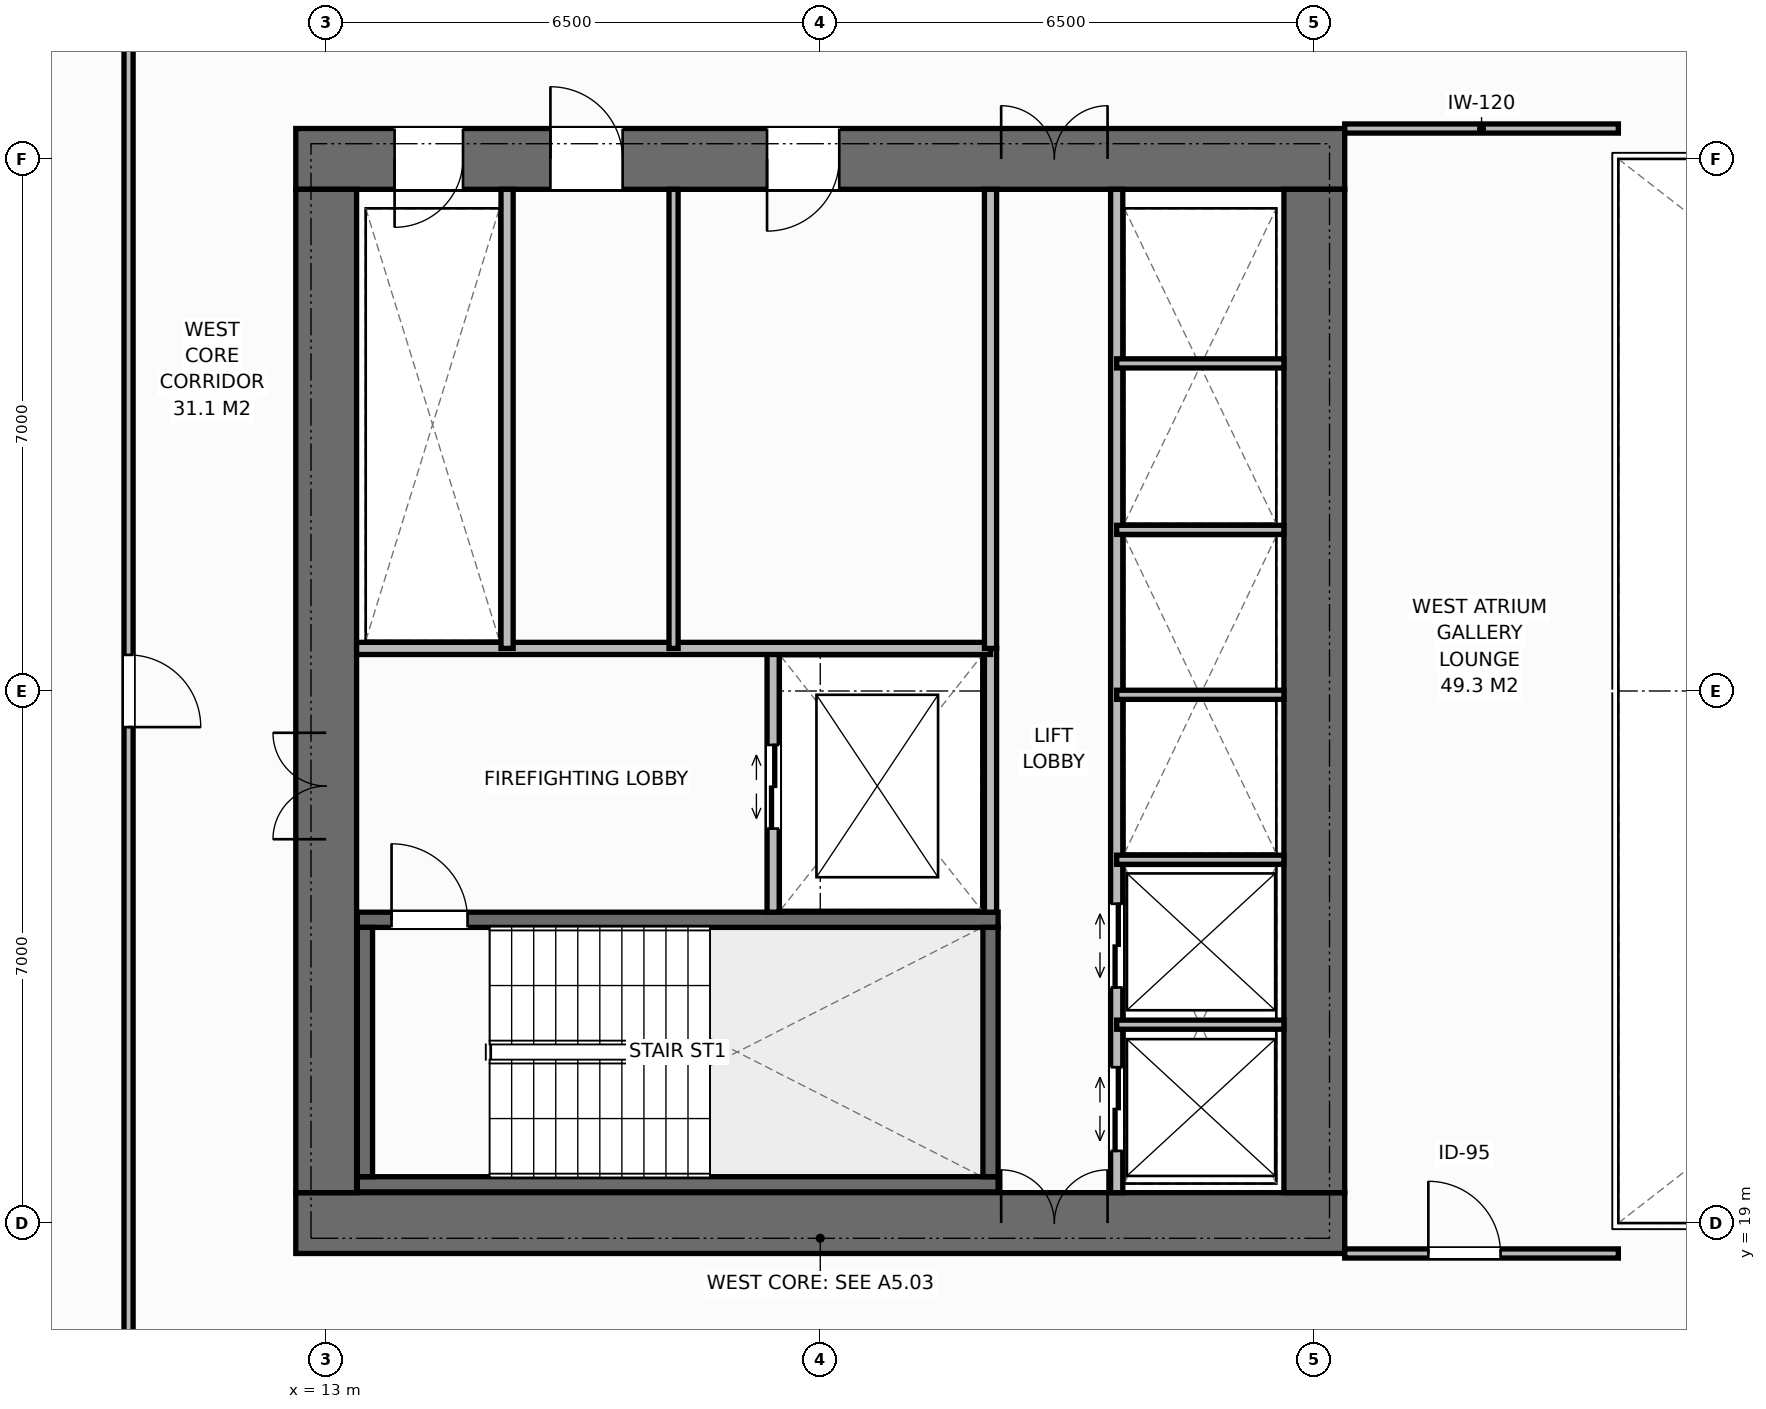
"""IFC4 building model, lengths in metres.
Left out: names, types, materials, properties, quantities, classifications, styles, units other than length and angle.
Written with IfcOpenShell. Run it as: python <this file> out.ifc"""

import sys

from ifc_helpers import new_model, si_unit, direction, frame, frame_2d, origin, place, context, subcontext, project, spatial, rectangle, extrude, element, fill, save


model = new_model("IFC4")
c1 = context("Model", 3, precision=1e-05, world=origin(), true_north=direction((0.0, 1.0)))
c2 = subcontext(c1, "Body", "Model", "MODEL_VIEW")
j1 = project(units=[si_unit("LENGTHUNIT", "METRE"), si_unit("PLANEANGLEUNIT", "RADIAN")], contexts=[c1])
p1 = place(None, origin())
s1 = spatial("IfcSite", under=j1, at=p1, CompositionType="ELEMENT")
p2 = place(p1, origin())
s2 = spatial("IfcBuilding", under=s1, at=p2, CompositionType="ELEMENT")
p3 = place(p2, frame((0.0, 0.0, 35.4)))
s3 = spatial("IfcBuildingStorey", under=s2, at=p3, CompositionType="ELEMENT", Elevation=35.4)
p4 = place(p3, frame((12.6, 19.0, 0.0), z_axis=(0.0, 0.0, 1.0), x_axis=(1.0, 0.0, 0.0)))
e1 = element("IfcWall", 1, at=p4, inside=s3, PredefinedType="SHEAR", context=c2, shape_type="SweptSolid", body=[
    extrude(rectangle(XDim=13.8, YDim=0.8, at=frame_2d((6.9, 0.0))), origin(), (0.0, 0.0, 1.0), 3.8),
])
p5 = place(p4, frame((9.28, 0.0, 0.0)))
e2 = element("IfcOpeningElement", 2, at=p5, cuts=e1, PredefinedType="OPENING", context=c2, shape_type="SweptSolid", body=[
    extrude(rectangle(XDim=1.4, YDim=2.2, at=frame_2d((0.7, 1.1))), frame((0.0, 0.41, 0.0), z_axis=(0.0, -1.0, 0.0), x_axis=(1.0, 0.0, 0.0)), (0.0, 0.0, 1.0), 0.82),
])
p6 = place(p3, frame((12.6, 33.0, 0.0), z_axis=(0.0, 0.0, 1.0), x_axis=(1.0, 0.0, 0.0)))
e3 = element("IfcWall", 3, at=p6, inside=s3, PredefinedType="SHEAR", context=c2, shape_type="SweptSolid", body=[
    extrude(rectangle(XDim=13.8, YDim=0.8, at=frame_2d((6.9, 0.0))), origin(), (0.0, 0.0, 1.0), 3.8),
])
p7 = place(p6, frame((1.3, 0.0, 0.0)))
e4 = element("IfcOpeningElement", 4, at=p7, cuts=e3, PredefinedType="OPENING", context=c2, shape_type="SweptSolid", body=[
    extrude(rectangle(XDim=0.9, YDim=2.15, at=frame_2d((0.45, 1.075))), frame((0.0, 0.41, 0.0), z_axis=(0.0, -1.0, 0.0), x_axis=(1.0, 0.0, 0.0)), (0.0, 0.0, 1.0), 0.82),
])
p8 = place(p6, frame((3.35, 0.0, 0.0)))
e5 = element("IfcOpeningElement", 5, at=p8, cuts=e3, PredefinedType="OPENING", context=c2, shape_type="SweptSolid", body=[
    extrude(rectangle(XDim=0.95, YDim=2.15, at=frame_2d((0.475, 1.075))), frame((0.0, 0.41, 0.0), z_axis=(0.0, -1.0, 0.0), x_axis=(1.0, 0.0, 0.0)), (0.0, 0.0, 1.0), 0.82),
])
p9 = place(p6, frame((6.2, 0.0, 0.0)))
e6 = element("IfcOpeningElement", 6, at=p9, cuts=e3, PredefinedType="OPENING", context=c2, shape_type="SweptSolid", body=[
    extrude(rectangle(XDim=0.95, YDim=2.15, at=frame_2d((0.475, 1.075))), frame((0.0, 0.41, 0.0), z_axis=(0.0, -1.0, 0.0), x_axis=(1.0, 0.0, 0.0)), (0.0, 0.0, 1.0), 0.82),
])
p10 = place(p6, frame((9.28, 0.0, 0.0)))
e7 = element("IfcOpeningElement", 7, at=p10, cuts=e3, PredefinedType="OPENING", context=c2, shape_type="SweptSolid", body=[
    extrude(rectangle(XDim=1.4, YDim=2.2, at=frame_2d((0.7, 1.1))), frame((0.0, 0.41, 0.0), z_axis=(0.0, -1.0, 0.0), x_axis=(1.0, 0.0, 0.0)), (0.0, 0.0, 1.0), 0.82),
])
p11 = place(p3, frame((13.0, 19.4, 0.0), z_axis=(0.0, 0.0, 1.0), x_axis=(0.0, 1.0, 0.0)))
e8 = element("IfcWall", 8, at=p11, inside=s3, PredefinedType="SHEAR", context=c2, shape_type="SweptSolid", body=[
    extrude(rectangle(XDim=13.2, YDim=0.8, at=frame_2d((6.6, 0.0))), origin(), (0.0, 0.0, 1.0), 3.8),
])
p12 = place(p11, frame((4.65, 0.0, 0.0)))
e9 = element("IfcOpeningElement", 9, at=p12, cuts=e8, PredefinedType="OPENING", context=c2, shape_type="SweptSolid", body=[
    extrude(rectangle(XDim=1.4, YDim=2.2, at=frame_2d((0.7, 1.1))), frame((0.0, 0.41, 0.0), z_axis=(0.0, -1.0, 0.0), x_axis=(1.0, 0.0, 0.0)), (0.0, 0.0, 1.0), 0.82),
])
p13 = place(p3, frame((26.0, 19.4, 0.0), z_axis=(0.0, 0.0, 1.0), x_axis=(0.0, 1.0, 0.0)))
e10 = element("IfcWall", 10, at=p13, inside=s3, PredefinedType="SHEAR", context=c2, shape_type="SweptSolid", body=[
    extrude(rectangle(XDim=13.2, YDim=0.8, at=frame_2d((6.6, 0.0))), origin(), (0.0, 0.0, 1.0), 3.8),
])
p14 = place(p3, frame((13.41, 19.51, 0.0), z_axis=(0.0, 0.0, 1.0), x_axis=(1.0, 0.0, 0.0)))
e11 = element("IfcWall", 11, at=p14, inside=s3, PredefinedType="SHEAR", context=c2, shape_type="SweptSolid", body=[
    extrude(rectangle(XDim=8.43, YDim=0.2, at=frame_2d((4.215, 0.0))), origin(), (0.0, 0.0, 1.0), 3.8),
])
p15 = place(p3, frame((13.41, 22.99, 0.0), z_axis=(0.0, 0.0, 1.0), x_axis=(1.0, 0.0, 0.0)))
e12 = element("IfcWall", 12, at=p15, inside=s3, PredefinedType="SHEAR", context=c2, shape_type="SweptSolid", body=[
    extrude(rectangle(XDim=8.43, YDim=0.2, at=frame_2d((4.215, 0.0))), origin(), (0.0, 0.0, 1.0), 3.8),
])
p16 = place(p15, frame((0.45, 0.0, 0.0)))
e13 = element("IfcOpeningElement", 13, at=p16, cuts=e12, PredefinedType="OPENING", context=c2, shape_type="SweptSolid", body=[
    extrude(rectangle(XDim=1.0, YDim=2.15, at=frame_2d((0.5, 1.075))), frame((0.0, 0.11, 0.0), z_axis=(0.0, -1.0, 0.0), x_axis=(1.0, 0.0, 0.0)), (0.0, 0.0, 1.0), 0.22),
])
for number, where, z_axis, x_axis in (
    (14, (13.51, 19.61, 0.0), (0.0, 0.0, 1.0), (0.0, 1.0, 0.0)),
    (15, (21.74, 19.61, 0.0), (0.0, 0.0, 1.0), (0.0, 1.0, 0.0)),
):
    element("IfcWall", number, at=place(p3, frame(where, z_axis=z_axis, x_axis=x_axis)), inside=s3, PredefinedType="SHEAR", context=c2, shape_type="SweptSolid", body=[
        extrude(rectangle(XDim=3.28, YDim=0.2, at=frame_2d((1.64, 0.0))), origin(), (0.0, 0.0, 1.0), 3.8),
    ])
p17 = place(p3, frame((21.74, 23.09, 0.0), z_axis=(0.0, 0.0, 1.0), x_axis=(0.0, 1.0, 0.0)))
e16 = element("IfcWall", 16, at=p17, inside=s3, PredefinedType="STANDARD", context=c2, shape_type="SweptSolid", body=[
    extrude(rectangle(XDim=3.47, YDim=0.16, at=frame_2d((1.735, 0.0))), origin(), (0.0, 0.0, 1.0), 3.55),
])
p18 = place(p3, frame((18.88, 23.09, 0.0), z_axis=(0.0, 0.0, 1.0), x_axis=(0.0, 1.0, 0.0)))
e17 = element("IfcWall", 17, at=p18, inside=s3, PredefinedType="STANDARD", context=c2, shape_type="SweptSolid", body=[
    extrude(rectangle(XDim=3.47, YDim=0.16, at=frame_2d((1.735, 0.0))), origin(), (0.0, 0.0, 1.0), 3.55),
])
p19 = place(p18, frame((1.1, 0.0, 0.0)))
e18 = element("IfcOpeningElement", 18, at=p19, cuts=e17, PredefinedType="OPENING", context=c2, shape_type="SweptSolid", body=[
    extrude(rectangle(XDim=1.1, YDim=2.2, at=frame_2d((0.55, 1.1))), frame((0.0, 0.09, 0.0), z_axis=(0.0, -1.0, 0.0), x_axis=(1.0, 0.0, 0.0)), (0.0, 0.0, 1.0), 0.18),
])
p20 = place(p3, frame((13.4, 26.56, 0.0), z_axis=(0.0, 0.0, 1.0), x_axis=(1.0, 0.0, 0.0)))
e19 = element("IfcWall", 19, at=p20, inside=s3, PredefinedType="STANDARD", context=c2, shape_type="SweptSolid", body=[
    extrude(rectangle(XDim=8.34, YDim=0.16, at=frame_2d((4.17, 0.0))), origin(), (0.0, 0.0, 1.0), 3.55),
])
p21 = place(p3, frame((15.38, 26.56, 0.0), z_axis=(0.0, 0.0, 1.0), x_axis=(0.0, 1.0, 0.0)))
e20 = element("IfcWall", 20, at=p21, inside=s3, PredefinedType="STANDARD", context=c2, shape_type="SweptSolid", body=[
    extrude(rectangle(XDim=6.04, YDim=0.16, at=frame_2d((3.02, 0.0))), origin(), (0.0, 0.0, 1.0), 3.55),
])
p22 = place(p3, frame((17.57, 26.56, 0.0), z_axis=(0.0, 0.0, 1.0), x_axis=(0.0, 1.0, 0.0)))
e21 = element("IfcWall", 21, at=p22, inside=s3, PredefinedType="PARTITIONING", context=c2, shape_type="SweptSolid", body=[
    extrude(rectangle(XDim=6.04, YDim=0.12, at=frame_2d((3.02, 0.0))), origin(), (0.0, 0.0, 1.0), 3.55),
])
p23 = place(p3, frame((21.74, 26.56, 0.0), z_axis=(0.0, 0.0, 1.0), x_axis=(0.0, 1.0, 0.0)))
e22 = element("IfcWall", 22, at=p23, inside=s3, PredefinedType="STANDARD", context=c2, shape_type="SweptSolid", body=[
    extrude(rectangle(XDim=6.04, YDim=0.16, at=frame_2d((3.02, 0.0))), origin(), (0.0, 0.0, 1.0), 3.55),
])
p24 = place(p3, frame((23.4, 19.4, 0.0), z_axis=(0.0, 0.0, 1.0), x_axis=(0.0, 1.0, 0.0)))
e23 = element("IfcWall", 23, at=p24, inside=s3, PredefinedType="STANDARD", context=c2, shape_type="SweptSolid", body=[
    extrude(rectangle(XDim=13.2, YDim=0.16, at=frame_2d((6.6, 0.0))), origin(), (0.0, 0.0, 1.0), 3.55),
])
p25 = place(p24, frame((0.55, 0.0, 0.0)))
e24 = element("IfcOpeningElement", 24, at=p25, cuts=e23, PredefinedType="OPENING", context=c2, shape_type="SweptSolid", body=[
    extrude(rectangle(XDim=1.1, YDim=2.2, at=frame_2d((0.55, 1.1))), frame((0.0, 0.09, 0.0), z_axis=(0.0, -1.0, 0.0), x_axis=(1.0, 0.0, 0.0)), (0.0, 0.0, 1.0), 0.18),
])
p26 = place(p24, frame((2.7, 0.0, 0.0)))
e25 = element("IfcOpeningElement", 25, at=p26, cuts=e23, PredefinedType="OPENING", context=c2, shape_type="SweptSolid", body=[
    extrude(rectangle(XDim=1.1, YDim=2.2, at=frame_2d((0.55, 1.1))), frame((0.0, 0.09, 0.0), z_axis=(0.0, -1.0, 0.0), x_axis=(1.0, 0.0, 0.0)), (0.0, 0.0, 1.0), 0.18),
])
for number, where, z_axis, x_axis in (
    (26, (23.4, 21.61, 0.0), (0.0, 0.0, 1.0), (1.0, 0.0, 0.0)),
    (27, (23.4, 23.78, 0.0), (0.0, 0.0, 1.0), (1.0, 0.0, 0.0)),
    (28, (23.4, 25.95, 0.0), (0.0, 0.0, 1.0), (1.0, 0.0, 0.0)),
    (29, (23.4, 28.12, 0.0), (0.0, 0.0, 1.0), (1.0, 0.0, 0.0)),
    (30, (23.4, 30.31, 0.0), (0.0, 0.0, 1.0), (1.0, 0.0, 0.0)),
):
    element("IfcWall", number, at=place(p3, frame(where, z_axis=z_axis, x_axis=x_axis)), inside=s3, PredefinedType="PARTITIONING", context=c2, shape_type="SweptSolid", body=[
        extrude(rectangle(XDim=2.2, YDim=0.12, at=frame_2d((1.1, 0.0))), origin(), (0.0, 0.0, 1.0), 3.55),
    ])
p27 = place(p3, frame((26.4, 33.4, 0.0), z_axis=(0.0, 0.0, 1.0), x_axis=(1.0, 0.0, 0.0)))
e31 = element("IfcWall", 31, at=p27, inside=s3, PredefinedType="PARTITIONING", context=c2, shape_type="SweptSolid", body=[
    extrude(rectangle(XDim=3.6, YDim=0.12, at=frame_2d((1.8, 0.0))), origin(), (0.0, 0.0, 1.0), 3.55),
])
p28 = place(p3, frame((26.4, 18.6, 0.0), z_axis=(0.0, 0.0, 1.0), x_axis=(1.0, 0.0, 0.0)))
e32 = element("IfcWall", 32, at=p28, inside=s3, PredefinedType="PARTITIONING", context=c2, shape_type="SweptSolid", body=[
    extrude(rectangle(XDim=3.6, YDim=0.12, at=frame_2d((1.8, 0.0))), origin(), (0.0, 0.0, 1.0), 3.55),
])
p29 = place(p28, frame((1.1, 0.0, 0.0)))
e33 = element("IfcOpeningElement", 33, at=p29, cuts=e32, PredefinedType="OPENING", context=c2, shape_type="SweptSolid", body=[
    extrude(rectangle(XDim=0.95, YDim=2.15, at=frame_2d((0.475, 1.075))), frame((0.0, 0.07, 0.0), z_axis=(0.0, -1.0, 0.0), x_axis=(1.0, 0.0, 0.0)), (0.0, 0.0, 1.0), 0.14),
])
p30 = place(p3, frame((10.4, 16.5, 0.0), z_axis=(0.0, 0.0, 1.0), x_axis=(0.0, 1.0, 0.0)))
e34 = element("IfcWall", 34, at=p30, inside=s3, PredefinedType="PARTITIONING", context=c2, shape_type="SweptSolid", body=[
    extrude(rectangle(XDim=19.0, YDim=0.12, at=frame_2d((9.5, 0.0))), origin(), (0.0, 0.0, 1.0), 3.55),
])
p31 = place(p30, frame((9.025, 0.0, 0.0)))
e35 = element("IfcOpeningElement", 35, at=p31, cuts=e34, PredefinedType="OPENING", context=c2, shape_type="SweptSolid", body=[
    extrude(rectangle(XDim=0.95, YDim=2.15, at=frame_2d((0.475, 1.075))), frame((0.0, 0.07, 0.0), z_axis=(0.0, -1.0, 0.0), x_axis=(1.0, 0.0, 0.0)), (0.0, 0.0, 1.0), 0.14),
])
p32 = place(p16, origin())
e36 = element("IfcDoor", 36, at=p32, inside=s3, OperationType="SINGLE_SWING_LEFT", PredefinedType="DOOR", context=c2, shape_type="SweptSolid", body=[
    extrude(rectangle(XDim=1.0, YDim=2.15, at=frame_2d((0.5, 1.075))), frame((0.0, 0.025, 0.0), z_axis=(0.0, -1.0, 0.0), x_axis=(1.0, 0.0, 0.0)), (0.0, 0.0, 1.0), 0.05),
])
fill(e13, e36)
p33 = place(p12, origin())
e37 = element("IfcDoor", 37, at=p33, inside=s3, OperationType="DOUBLE_DOOR_SINGLE_SWING", PredefinedType="DOOR", context=c2, shape_type="SweptSolid", body=[
    extrude(rectangle(XDim=1.4, YDim=2.2, at=frame_2d((0.7, 1.1))), frame((0.0, 0.025, 0.0), z_axis=(0.0, -1.0, 0.0), x_axis=(1.0, 0.0, 0.0)), (0.0, 0.0, 1.0), 0.05),
])
fill(e9, e37)
p34 = place(p19, origin())
e38 = element("IfcDoor", 38, at=p34, inside=s3, OperationType="DOUBLE_DOOR_SLIDING", PredefinedType="DOOR", context=c2, shape_type="SweptSolid", body=[
    extrude(rectangle(XDim=1.1, YDim=2.2, at=frame_2d((0.55, 1.1))), frame((0.0, 0.025, 0.0), z_axis=(0.0, -1.0, 0.0), x_axis=(1.0, 0.0, 0.0)), (0.0, 0.0, 1.0), 0.05),
])
fill(e18, e38)
p35 = place(p7, origin())
e39 = element("IfcDoor", 39, at=p35, inside=s3, OperationType="SINGLE_SWING_RIGHT", PredefinedType="DOOR", context=c2, shape_type="SweptSolid", body=[
    extrude(rectangle(XDim=0.9, YDim=2.15, at=frame_2d((0.45, 1.075))), frame((0.0, -0.075, 0.0), z_axis=(0.0, -1.0, 0.0), x_axis=(1.0, 0.0, 0.0)), (0.0, 0.0, 1.0), 0.05),
])
fill(e4, e39)
p36 = place(p8, origin())
e40 = element("IfcDoor", 40, at=p36, inside=s3, OperationType="SINGLE_SWING_LEFT", PredefinedType="DOOR", context=c2, shape_type="SweptSolid", body=[
    extrude(rectangle(XDim=0.95, YDim=2.15, at=frame_2d((0.475, 1.075))), frame((0.0, -0.075, 0.0), z_axis=(0.0, -1.0, 0.0), x_axis=(1.0, 0.0, 0.0)), (0.0, 0.0, 1.0), 0.05),
])
fill(e5, e40)
p37 = place(p9, origin())
e41 = element("IfcDoor", 41, at=p37, inside=s3, OperationType="SINGLE_SWING_RIGHT", PredefinedType="DOOR", context=c2, shape_type="SweptSolid", body=[
    extrude(rectangle(XDim=0.95, YDim=2.15, at=frame_2d((0.475, 1.075))), frame((0.0, -0.075, 0.0), z_axis=(0.0, -1.0, 0.0), x_axis=(1.0, 0.0, 0.0)), (0.0, 0.0, 1.0), 0.05),
])
fill(e6, e41)
p38 = place(p5, origin())
e42 = element("IfcDoor", 42, at=p38, inside=s3, OperationType="DOUBLE_DOOR_SINGLE_SWING", PredefinedType="DOOR", context=c2, shape_type="SweptSolid", body=[
    extrude(rectangle(XDim=1.4, YDim=2.2, at=frame_2d((0.7, 1.1))), frame((0.0, 0.125, 0.0), z_axis=(0.0, -1.0, 0.0), x_axis=(1.0, 0.0, 0.0)), (0.0, 0.0, 1.0), 0.05),
])
fill(e2, e42)
p39 = place(p10, origin())
e43 = element("IfcDoor", 43, at=p39, inside=s3, OperationType="DOUBLE_DOOR_SINGLE_SWING", PredefinedType="DOOR", context=c2, shape_type="SweptSolid", body=[
    extrude(rectangle(XDim=1.4, YDim=2.2, at=frame_2d((0.7, 1.1))), frame((0.0, -0.075, 0.0), z_axis=(0.0, -1.0, 0.0), x_axis=(1.0, 0.0, 0.0)), (0.0, 0.0, 1.0), 0.05),
])
fill(e7, e43)
p40 = place(p25, origin())
e44 = element("IfcDoor", 44, at=p40, inside=s3, OperationType="DOUBLE_DOOR_SLIDING", PredefinedType="DOOR", context=c2, shape_type="SweptSolid", body=[
    extrude(rectangle(XDim=1.1, YDim=2.2, at=frame_2d((0.55, 1.1))), frame((0.0, 0.025, 0.0), z_axis=(0.0, -1.0, 0.0), x_axis=(1.0, 0.0, 0.0)), (0.0, 0.0, 1.0), 0.05),
])
fill(e24, e44)
p41 = place(p26, origin())
e45 = element("IfcDoor", 45, at=p41, inside=s3, OperationType="DOUBLE_DOOR_SLIDING", PredefinedType="DOOR", context=c2, shape_type="SweptSolid", body=[
    extrude(rectangle(XDim=1.1, YDim=2.2, at=frame_2d((0.55, 1.1))), frame((0.0, 0.025, 0.0), z_axis=(0.0, -1.0, 0.0), x_axis=(1.0, 0.0, 0.0)), (0.0, 0.0, 1.0), 0.05),
])
fill(e25, e45)
p42 = place(p29, origin())
e46 = element("IfcDoor", 46, at=p42, inside=s3, OperationType="SINGLE_SWING_LEFT", PredefinedType="DOOR", context=c2, shape_type="SweptSolid", body=[
    extrude(rectangle(XDim=0.95, YDim=2.15, at=frame_2d((0.475, 1.075))), frame((0.0, 0.025, 0.0), z_axis=(0.0, -1.0, 0.0), x_axis=(1.0, 0.0, 0.0)), (0.0, 0.0, 1.0), 0.05),
])
fill(e33, e46)
p43 = place(p31, origin())
e47 = element("IfcDoor", 47, at=p43, inside=s3, OperationType="SINGLE_SWING_RIGHT", PredefinedType="DOOR", context=c2, shape_type="SweptSolid", body=[
    extrude(rectangle(XDim=0.95, YDim=2.15, at=frame_2d((0.475, 1.075))), frame((0.0, 0.025, 0.0), z_axis=(0.0, -1.0, 0.0), x_axis=(1.0, 0.0, 0.0)), (0.0, 0.0, 1.0), 0.05),
])
fill(e35, e47)
save(model, sys.argv[1])
